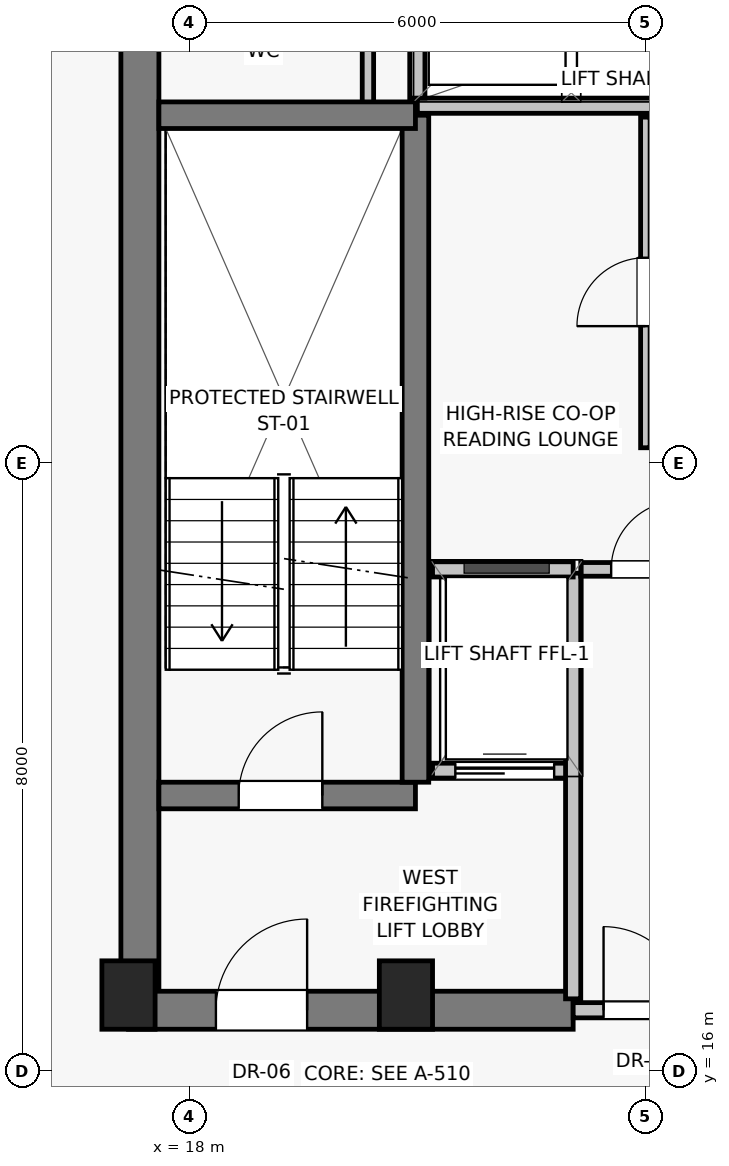
"""IFC4 building model, lengths in metres.
Left out: names, types, materials, properties, quantities, classifications, styles, units other than length and angle.
Written with IfcOpenShell. Run it as: python <this file> out.ifc"""

import sys

from ifc_helpers import new_model, si_unit, direction, frame, frame_2d, origin, origin_2d, place, context, subcontext, project, spatial, rectangle, extrude, source, transform, mapped, element, fill, save


model = new_model("IFC4")
c1 = context("Model", 3, precision=1e-05, world=origin(), true_north=direction((0.0, 1.0)))
c2 = subcontext(c1, "Body", "Model", "MODEL_VIEW")
j1 = project(units=[si_unit("LENGTHUNIT", "METRE"), si_unit("PLANEANGLEUNIT", "RADIAN")], contexts=[c1])
p1 = place(None, origin())
s1 = spatial("IfcSite", under=j1, at=p1, CompositionType="ELEMENT")
p2 = place(p1, origin())
s2 = spatial("IfcBuilding", under=s1, at=p2, CompositionType="ELEMENT")
p3 = place(p2, frame((0.0, 0.0, 257.75)))
s3 = spatial("IfcBuildingStorey", under=s2, at=p3, CompositionType="ELEMENT", Elevation=257.75)
for number, where, z_axis, x_axis in (
    (1, (17.2, 17.0, 0.0), (0.0, 0.0, 1.0), (1.0, 0.0, 0.0)),
    (2, (20.85, 17.0, 0.0), (0.0, 0.0, 1.0), (1.0, 0.0, 0.0)),
):
    element("IfcColumn", number, at=place(p3, frame(where, z_axis=z_axis, x_axis=x_axis)), inside=s3, PredefinedType="PILASTER", context=c2, shape_type="SweptSolid", body=[
        extrude(rectangle(XDim=0.7, YDim=0.9, at=origin_2d()), origin(), (0.0, 0.0, 1.0), 3.25),
    ])
p4 = place(p3, frame((17.35, 16.8, 0.0), z_axis=(0.0, 0.0, 1.0), x_axis=(0.0, 1.0, 0.0)))
e3 = element("IfcWall", 3, at=p4, inside=s3, PredefinedType="SHEAR", context=c2, shape_type="SweptSolid", body=[
    extrude(rectangle(XDim=14.2, YDim=0.5, at=frame_2d((7.1, 0.0))), origin(), (0.0, 0.0, 1.0), 3.015),
])
p5 = place(p3, frame((17.2, 16.8, 0.0), z_axis=(0.0, 0.0, 1.0), x_axis=(1.0, 0.0, 0.0)))
e4 = element("IfcWall", 4, at=p5, inside=s3, PredefinedType="SHEAR", context=c2, shape_type="SweptSolid", body=[
    extrude(rectangle(XDim=5.85, YDim=0.5, at=frame_2d((2.925, 0.0))), origin(), (0.0, 0.0, 1.0), 3.015),
])
p6 = place(p5, frame((1.15, 0.0, 0.0)))
e5 = element("IfcOpeningElement", 5, at=p6, cuts=e4, PredefinedType="OPENING", context=c2, shape_type="SweptSolid", body=[
    extrude(rectangle(XDim=1.2, YDim=2.03, at=frame_2d((0.6, 1.015))), frame((0.0, 0.26, 0.0), z_axis=(0.0, -1.0, 0.0), x_axis=(1.0, 0.0, 0.0)), (0.0, 0.0, 1.0), 0.52),
])
p7 = place(p3, frame((23.05, 16.8, 0.0), z_axis=(0.0, 0.0, 1.0), x_axis=(1.0, 0.0, 0.0)))
e6 = element("IfcWall", 6, at=p7, inside=s3, PredefinedType="SOLIDWALL", context=c2, shape_type="SweptSolid", body=[
    extrude(rectangle(XDim=1.9, YDim=0.2, at=frame_2d((0.95, 0.0))), origin(), (0.0, 0.0, 1.0), 2.165),
])
p8 = place(p7, frame((0.4, 0.0, 0.0)))
e7 = element("IfcOpeningElement", 7, at=p8, cuts=e6, PredefinedType="OPENING", context=c2, shape_type="SweptSolid", body=[
    extrude(rectangle(XDim=1.1, YDim=2.03, at=frame_2d((0.55, 1.015))), frame((0.0, 0.11, 0.0), z_axis=(0.0, -1.0, 0.0), x_axis=(1.0, 0.0, 0.0)), (0.0, 0.0, 1.0), 0.22),
])
p9 = place(p3, frame((20.35, 28.65, 0.0), z_axis=(0.0, 0.0, 1.0), x_axis=(0.0, 1.0, 0.0)))
e8 = element("IfcWall", 8, at=p9, inside=s3, PredefinedType="PARTITIONING", context=c2, shape_type="SweptSolid", body=[
    extrude(rectangle(XDim=2.2, YDim=0.15, at=frame_2d((1.1, 0.0))), origin(), (0.0, 0.0, 1.0), 3.015),
])
p10 = place(p3, frame((17.6, 19.625, 0.0), z_axis=(0.0, 0.0, 1.0), x_axis=(1.0, 0.0, 0.0)))
e9 = element("IfcWall", 9, at=p10, inside=s3, PredefinedType="SHEAR", context=c2, shape_type="SweptSolid", body=[
    extrude(rectangle(XDim=3.375, YDim=0.35, at=frame_2d((1.688, 0.0))), origin(), (0.0, 0.0, 1.0), 3.015),
])
p11 = place(p10, frame((1.05, 0.0, 0.0)))
e10 = element("IfcOpeningElement", 10, at=p11, cuts=e9, PredefinedType="OPENING", context=c2, shape_type="SweptSolid", body=[
    extrude(rectangle(XDim=1.1, YDim=2.03, at=frame_2d((0.55, 1.015))), frame((0.0, 0.185, 0.0), z_axis=(0.0, -1.0, 0.0), x_axis=(1.0, 0.0, 0.0)), (0.0, 0.0, 1.0), 0.37),
])
p12 = place(p3, frame((21.2, 19.95, 0.0), z_axis=(0.0, 0.0, 1.0), x_axis=(1.0, 0.0, 0.0)))
e11 = element("IfcWall", 11, at=p12, inside=s3, PredefinedType="SOLIDWALL", context=c2, shape_type="SweptSolid", body=[
    extrude(rectangle(XDim=1.85, YDim=0.2, at=frame_2d((0.925, 0.0))), origin(), (0.0, 0.0, 1.0), 3.015),
])
p13 = place(p12, frame((0.3, 0.0, 0.0)))
e12 = element("IfcOpeningElement", 12, at=p13, cuts=e11, PredefinedType="OPENING", context=c2, shape_type="SweptSolid", body=[
    extrude(rectangle(XDim=1.3, YDim=2.25, at=frame_2d((0.65, 1.125))), frame((0.0, 0.11, 0.0), z_axis=(0.0, -1.0, 0.0), x_axis=(1.0, 0.0, 0.0)), (0.0, 0.0, 1.0), 0.22),
])
p14 = place(p3, frame((20.975, 19.8, 0.0), z_axis=(0.0, 0.0, 1.0), x_axis=(0.0, 1.0, 0.0)))
e13 = element("IfcWall", 13, at=p14, inside=s3, PredefinedType="SHEAR", context=c2, shape_type="SweptSolid", body=[
    extrude(rectangle(XDim=8.775, YDim=0.35, at=frame_2d((4.387, 0.0))), origin(), (0.0, 0.0, 1.0), 3.015),
])
p15 = place(p3, frame((17.6, 28.575, 0.0), z_axis=(0.0, 0.0, 1.0), x_axis=(1.0, 0.0, 0.0)))
e14 = element("IfcWall", 14, at=p15, inside=s3, PredefinedType="SHEAR", context=c2, shape_type="SweptSolid", body=[
    extrude(rectangle(XDim=3.375, YDim=0.35, at=frame_2d((1.688, 0.0))), origin(), (0.0, 0.0, 1.0), 3.015),
])
p16 = place(p3, frame((23.05, 16.95, 0.0), z_axis=(0.0, 0.0, 1.0), x_axis=(0.0, 1.0, 0.0)))
e15 = element("IfcWall", 15, at=p16, inside=s3, PredefinedType="SOLIDWALL", context=c2, shape_type="SweptSolid", body=[
    extrude(rectangle(XDim=5.6, YDim=0.2, at=frame_2d((2.8, 0.0))), origin(), (0.0, 0.0, 1.0), 3.015),
])
p17 = place(p3, frame((21.2, 22.6, 0.0), z_axis=(0.0, 0.0, 1.0), x_axis=(1.0, 0.0, 0.0)))
e16 = element("IfcWall", 16, at=p17, inside=s3, PredefinedType="SOLIDWALL", context=c2, shape_type="SweptSolid", body=[
    extrude(rectangle(XDim=1.85, YDim=0.2, at=frame_2d((0.925, 0.0))), origin(), (0.0, 0.0, 1.0), 3.015),
])
p18 = place(p3, frame((21.0, 28.7, 0.0), z_axis=(0.0, 0.0, 1.0), x_axis=(1.0, 0.0, 0.0)))
e17 = element("IfcWall", 17, at=p18, inside=s3, PredefinedType="SOLIDWALL", context=c2, shape_type="SweptSolid", body=[
    extrude(rectangle(XDim=6.0, YDim=0.2, at=frame_2d((3.0, 0.0))), origin(), (0.0, 0.0, 1.0), 3.015),
])
p19 = place(p3, frame((21.0, 28.8, 0.0), z_axis=(0.0, 0.0, 1.0), x_axis=(0.0, 1.0, 0.0)))
e18 = element("IfcWall", 18, at=p19, inside=s3, PredefinedType="SOLIDWALL", context=c2, shape_type="SweptSolid", body=[
    extrude(rectangle(XDim=1.6, YDim=0.2, at=frame_2d((0.8, 0.0))), origin(), (0.0, 0.0, 1.0), 3.015),
])
p20 = place(p3, frame((23.15, 22.6, 0.0), z_axis=(0.0, 0.0, 1.0), x_axis=(1.0, 0.0, 0.0)))
e19 = element("IfcWall", 19, at=p20, inside=s3, PredefinedType="PARTITIONING", context=c2, shape_type="SweptSolid", body=[
    extrude(rectangle(XDim=1.7, YDim=0.18, at=frame_2d((0.85, 0.0))), origin(), (0.0, 0.0, 1.0), 3.015),
])
p21 = place(p20, frame((0.4, 0.0, 0.0)))
e20 = element("IfcOpeningElement", 20, at=p21, cuts=e19, PredefinedType="OPENING", context=c2, shape_type="SweptSolid", body=[
    extrude(rectangle(XDim=0.9, YDim=2.01, at=frame_2d((0.45, 1.005))), frame((0.0, 0.1, 0.0), z_axis=(0.0, -1.0, 0.0), x_axis=(1.0, 0.0, 0.0)), (0.0, 0.0, 1.0), 0.2),
])
p22 = place(p3, frame((24.0, 24.2, 0.0), z_axis=(0.0, 0.0, 1.0), x_axis=(0.0, 1.0, 0.0)))
e21 = element("IfcWall", 21, at=p22, inside=s3, PredefinedType="PARTITIONING", context=c2, shape_type="SweptSolid", body=[
    extrude(rectangle(XDim=4.35, YDim=0.125, at=frame_2d((2.175, 0.0))), origin(), (0.0, 0.0, 1.0), 3.015),
])
p23 = place(p22, frame((1.6, 0.0, 0.0)))
e22 = element("IfcOpeningElement", 22, at=p23, cuts=e21, PredefinedType="OPENING", context=c2, shape_type="SweptSolid", body=[
    extrude(rectangle(XDim=0.9, YDim=2.01, at=frame_2d((0.45, 1.005))), frame((0.0, 0.073, 0.0), z_axis=(0.0, -1.0, 0.0), x_axis=(1.0, 0.0, 0.0)), (0.0, 0.0, 1.0), 0.145),
])
m1 = source(origin(), c2, "Body", "SweptSolid", [
    extrude(rectangle(XDim=1.2, YDim=2.03, at=frame_2d((0.6, 1.015))), frame((0.0, 0.025, 0.0), z_axis=(0.0, -1.0, 0.0), x_axis=(1.0, 0.0, 0.0)), (0.0, 0.0, 1.0), 0.05),
])
p24 = place(p6, origin())
e23 = element("IfcDoor", 23, at=p24, inside=s3, OperationType="SINGLE_SWING_RIGHT", PredefinedType="DOOR", context=c2, shape_type="MappedRepresentation", body=[
    mapped(m1, transform((0.0, 0.0, 0.0), scale=1.0)),
])
fill(e5, e23)
m2 = source(origin(), c2, "Body", "SweptSolid", [
    extrude(rectangle(XDim=1.1, YDim=2.03, at=frame_2d((0.55, 1.015))), frame((0.0, 0.025, 0.0), z_axis=(0.0, -1.0, 0.0), x_axis=(1.0, 0.0, 0.0)), (0.0, 0.0, 1.0), 0.05),
])
p25 = place(p8, origin())
e24 = element("IfcDoor", 24, at=p25, inside=s3, OperationType="SINGLE_SWING_LEFT", PredefinedType="DOOR", context=c2, shape_type="MappedRepresentation", body=[
    mapped(m2, transform((0.0, 0.0, 0.0), scale=1.0)),
])
fill(e7, e24)
p26 = place(p11, origin())
e25 = element("IfcDoor", 25, at=p26, inside=s3, OperationType="SINGLE_SWING_RIGHT", PredefinedType="DOOR", context=c2, shape_type="MappedRepresentation", body=[
    mapped(m2, transform((0.0, 0.0, 0.0), scale=1.0)),
])
fill(e10, e25)
m3 = source(origin(), c2, "Body", "SweptSolid", [
    extrude(rectangle(XDim=1.3, YDim=2.25, at=frame_2d((0.65, 1.125))), frame((0.0, 0.025, 0.0), z_axis=(0.0, -1.0, 0.0), x_axis=(1.0, 0.0, 0.0)), (0.0, 0.0, 1.0), 0.05),
])
p27 = place(p13, origin())
e26 = element("IfcDoor", 26, at=p27, inside=s3, OperationType="SLIDING_TO_LEFT", PredefinedType="DOOR", context=c2, shape_type="MappedRepresentation", body=[
    mapped(m3, transform((0.0, 0.0, 0.0), scale=1.0)),
])
fill(e12, e26)
m4 = source(origin(), c2, "Body", "SweptSolid", [
    extrude(rectangle(XDim=0.9, YDim=2.01, at=frame_2d((0.45, 1.005))), frame((0.0, 0.025, 0.0), z_axis=(0.0, -1.0, 0.0), x_axis=(1.0, 0.0, 0.0)), (0.0, 0.0, 1.0), 0.05),
])
p28 = place(p21, origin())
e27 = element("IfcDoor", 27, at=p28, inside=s3, OperationType="SINGLE_SWING_RIGHT", PredefinedType="DOOR", context=c2, shape_type="MappedRepresentation", body=[
    mapped(m4, transform((0.0, 0.0, 0.0), scale=1.0)),
])
fill(e20, e27)
p29 = place(p23, origin())
e28 = element("IfcDoor", 28, at=p29, inside=s3, OperationType="SINGLE_SWING_LEFT", PredefinedType="DOOR", context=c2, shape_type="MappedRepresentation", body=[
    mapped(m4, transform((0.0, 0.0, 0.0), scale=1.0)),
])
fill(e22, e28)
save(model, sys.argv[1])
